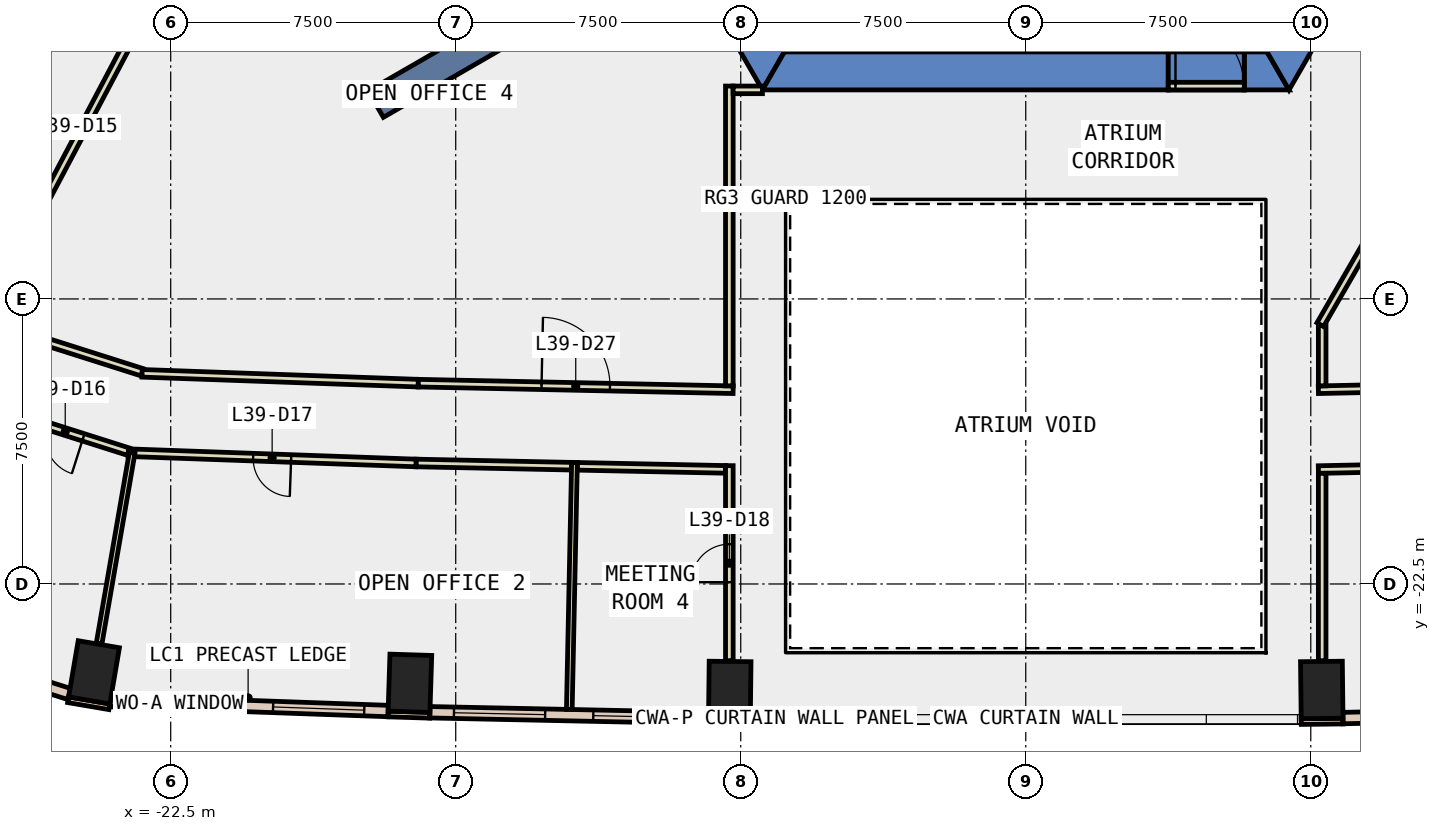
"""IFC4 building model, lengths in metres.
Left out: names, types, materials, properties, quantities, classifications, styles, units other than length and angle.
Written with IfcOpenShell. Run it as: python <this file> out.ifc"""

import sys

from ifc_helpers import new_model, si_unit, direction, frame, frame_2d, origin, origin_2d, place, context, subcontext, project, spatial, polyline, rectangle, outline, extrude, element, fill, save


model = new_model("IFC4")
c1 = context("Model", 3, precision=1e-05, world=origin(), true_north=direction((0.0, 1.0)))
c2 = subcontext(c1, "Body", "Model", "MODEL_VIEW")
j1 = project(units=[si_unit("LENGTHUNIT", "METRE"), si_unit("PLANEANGLEUNIT", "RADIAN")], contexts=[c1])
p1 = place(None, origin())
s1 = spatial("IfcSite", under=j1, at=p1, CompositionType="ELEMENT")
p2 = place(p1, origin())
s2 = spatial("IfcBuilding", under=s1, at=p2, CompositionType="ELEMENT")
p3 = place(p2, frame((0.0, 0.0, 176.0)))
s3 = spatial("IfcBuildingStorey", under=s2, at=p3, CompositionType="ELEMENT", Elevation=176.0)
for number, where, z_axis, x_axis in (
    (1, (-24.518, -24.825, -0.4), (0.0, 0.0, 1.0), (-0.986, 0.168, 0.0)),
    (2, (-16.205, -25.113, -0.4), (0.0, 0.0, 1.0), (-0.999, 0.032, 0.0)),
    (3, (-7.789, -25.289, -0.4), (0.0, 0.0, 1.0), (-1.0, 0.012, 0.0)),
    (4, (7.789, -25.289, -0.4), (0.0, 0.0, 1.0), (1.0, 0.012, 0.0)),
):
    element("IfcColumn", number, at=place(p3, frame(where, z_axis=z_axis, x_axis=x_axis)), inside=s3, PredefinedType="COLUMN", context=c2, shape_type="SweptSolid", body=[
        extrude(rectangle(XDim=1.1, YDim=1.5, at=origin_2d()), origin(), (0.0, 0.0, 1.0), 4.2),
    ])
p4 = place(p3, frame((0.0, 0.0, -0.4)))
e5 = element("IfcWall", 5, at=p4, inside=s3, PredefinedType="SHEAR", context=c2, shape_type="SweptSolid", body=[
    extrude(outline(polyline([(-13.856, 2.5), (-6.928, -9.5), (-6.351, -8.5), (-12.702, 2.5), (-13.856, 2.5)])), origin(), (0.0, 0.0, 1.0), 4.2),
])
p5 = place(p3, frame((0.0, 0.0, -0.4)))
e6 = element("IfcWall", 6, at=p5, inside=s3, PredefinedType="SHEAR", context=c2, shape_type="SweptSolid", body=[
    extrude(outline(polyline([(3.75, -9.5), (3.75, -8.5), (-6.351, -8.5), (-6.928, -9.5), (3.75, -9.5)])), origin(), (0.0, 0.0, 1.0), 4.2),
])
p6 = place(p3, frame((0.0, 0.0, -0.4)))
e7 = element("IfcWall", 7, at=p6, inside=s3, PredefinedType="SHEAR", context=c2, shape_type="SweptSolid", body=[
    extrude(outline(polyline([(5.75, -8.5), (5.75, -9.5), (6.928, -9.5), (6.351, -8.5), (5.75, -8.5)])), origin(), (0.0, 0.0, 1.0), 4.2),
])
p7 = place(p3, frame((0.0, 0.0, 3.6)))
e8 = element("IfcWall", 8, at=p7, inside=s3, PredefinedType="SHEAR", context=c2, shape_type="SweptSolid", body=[
    extrude(outline(polyline([(5.75, -9.5), (5.75, -8.5), (3.75, -8.5), (3.75, -9.5), (5.75, -9.5)])), origin(), (0.0, 0.0, 1.0), 0.2),
])
p8 = place(p3, frame((0.0, 0.0, -0.4)))
e9 = element("IfcWall", 9, at=p8, inside=s3, PredefinedType="SHEAR", context=c2, shape_type="SweptSolid", body=[
    extrude(outline(polyline([(8.117, -7.44), (7.252, -6.94), (6.351, -8.5), (6.928, -9.5), (8.117, -7.44)])), origin(), (0.0, 0.0, 1.0), 4.2),
])
p9 = place(p3, frame((-9.31, -5.375, -0.4), z_axis=(0.0, 0.0, 1.0), x_axis=(-0.866017533419, -0.500013631625, 0.0)))
e10 = element("IfcWall", 10, at=p9, inside=s3, PredefinedType="SHEAR", context=c2, shape_type="SweptSolid", body=[
    extrude(rectangle(XDim=9.0, YDim=0.8, at=frame_2d((4.5, 0.0))), origin(), (0.0, 0.0, 1.0), 4.2),
])
p10 = place(p3, frame((-25.199, -25.546, 0.0), z_axis=(0.0, 0.0, 1.0), x_axis=(0.985763338892, -0.168138751323, 0.0)))
e11 = element("IfcWall", 11, at=p10, inside=s3, PredefinedType="STANDARD", context=c2, shape_type="SweptSolid", body=[
    extrude(rectangle(XDim=1.101, YDim=0.15, at=frame_2d((0.55, 0.0))), origin(), (0.0, 0.0, 1.0), 3.8),
])
p11 = place(p3, frame((-16.781, -25.921, 0.0), z_axis=(0.0, 0.0, 1.0), x_axis=(0.99951682968, -0.031082264806, 0.0)))
e12 = element("IfcWall", 12, at=p11, inside=s3, PredefinedType="STANDARD", context=c2, shape_type="SweptSolid", body=[
    extrude(rectangle(XDim=1.1, YDim=0.15, at=frame_2d((0.55, 0.0))), origin(), (0.0, 0.0, 1.0), 3.8),
])
for number, where, z_axis, x_axis in (
    (13, (-8.349, -26.108, 0.0), (0.0, 0.0, 1.0), (1.0, -0.011, 0.0)),
    (14, (7.249, -26.12, 0.0), (0.0, 0.0, 1.0), (1.0, 0.011, 0.0)),
):
    element("IfcWall", number, at=place(p3, frame(where, z_axis=z_axis, x_axis=x_axis)), inside=s3, PredefinedType="STANDARD", context=c2, shape_type="SweptSolid", body=[
        extrude(rectangle(XDim=1.1, YDim=0.15, at=frame_2d((0.55, 0.0))), origin(), (0.0, 0.0, 1.0), 3.8),
    ])
p12 = place(p3, frame((-24.09, -25.583, 0.0), z_axis=(0.0, 0.0, 1.0), x_axis=(0.999368368263, -0.035536805082, 0.0)))
e15 = element("IfcWall", 15, at=p12, inside=s3, PredefinedType="STANDARD", context=c2, shape_type="SweptSolid", body=[
    extrude(rectangle(XDim=7.317, YDim=0.3, at=frame_2d((3.658, 0.0))), origin(), (0.0, 0.0, 1.0), 3.8),
])
p13 = place(p12, frame((0.629, 0.0, 0.9)))
e16 = element("IfcOpeningElement", 16, at=p13, cuts=e15, PredefinedType="OPENING", context=c2, shape_type="SweptSolid", body=[
    extrude(rectangle(XDim=2.4, YDim=2.6, at=frame_2d((1.2, 1.3))), frame((0.0, 0.16, 0.0), z_axis=(0.0, -1.0, 0.0), x_axis=(1.0, 0.0, 0.0)), (0.0, 0.0, 1.0), 0.32),
])
p14 = place(p12, frame((4.287, 0.0, 0.9)))
e17 = element("IfcOpeningElement", 17, at=p14, cuts=e15, PredefinedType="OPENING", context=c2, shape_type="SweptSolid", body=[
    extrude(rectangle(XDim=2.4, YDim=2.6, at=frame_2d((1.2, 1.3))), frame((0.0, 0.16, 0.0), z_axis=(0.0, -1.0, 0.0), x_axis=(1.0, 0.0, 0.0)), (0.0, 0.0, 1.0), 0.32),
])
p15 = place(p3, frame((-15.68, -25.875, 0.0), z_axis=(0.0, 0.0, 1.0), x_axis=(0.999782189413, -0.020870403275, 0.0)))
e18 = element("IfcWall", 18, at=p15, inside=s3, PredefinedType="STANDARD", context=c2, shape_type="SweptSolid", body=[
    extrude(rectangle(XDim=7.335, YDim=0.3, at=frame_2d((3.667, 0.0))), origin(), (0.0, 0.0, 1.0), 3.8),
])
p16 = place(p15, frame((0.634, 0.0, 0.9)))
e19 = element("IfcOpeningElement", 19, at=p16, cuts=e18, PredefinedType="OPENING", context=c2, shape_type="SweptSolid", body=[
    extrude(rectangle(XDim=2.4, YDim=2.6, at=frame_2d((1.2, 1.3))), frame((0.0, 0.16, 0.0), z_axis=(0.0, -1.0, 0.0), x_axis=(1.0, 0.0, 0.0)), (0.0, 0.0, 1.0), 0.32),
])
p17 = place(p15, frame((4.301, 0.0, 0.9)))
e20 = element("IfcOpeningElement", 20, at=p17, cuts=e18, PredefinedType="OPENING", context=c2, shape_type="SweptSolid", body=[
    extrude(rectangle(XDim=2.4, YDim=2.6, at=frame_2d((1.2, 1.3))), frame((0.0, 0.16, 0.0), z_axis=(0.0, -1.0, 0.0), x_axis=(1.0, 0.0, 0.0)), (0.0, 0.0, 1.0), 0.32),
])
p18 = place(p3, frame((8.347, -26.028, 0.0), z_axis=(0.0, 0.0, 1.0), x_axis=(0.999782189413, 0.020870403275, 0.0)))
e21 = element("IfcWall", 21, at=p18, inside=s3, PredefinedType="STANDARD", context=c2, shape_type="SweptSolid", body=[
    extrude(rectangle(XDim=7.335, YDim=0.3, at=frame_2d((3.667, 0.0))), origin(), (0.0, 0.0, 1.0), 3.8),
])
p19 = place(p18, frame((0.634, 0.0, 0.9)))
e22 = element("IfcOpeningElement", 22, at=p19, cuts=e21, PredefinedType="OPENING", context=c2, shape_type="SweptSolid", body=[
    extrude(rectangle(XDim=2.4, YDim=2.6, at=frame_2d((1.2, 1.3))), frame((0.0, 0.16, 0.0), z_axis=(0.0, -1.0, 0.0), x_axis=(1.0, 0.0, 0.0)), (0.0, 0.0, 1.0), 0.32),
])
p20 = place(p18, frame((4.301, 0.0, 0.9)))
e23 = element("IfcOpeningElement", 23, at=p20, cuts=e21, PredefinedType="OPENING", context=c2, shape_type="SweptSolid", body=[
    extrude(rectangle(XDim=2.4, YDim=2.6, at=frame_2d((1.2, 1.3))), frame((0.0, 0.16, 0.0), z_axis=(0.0, -1.0, 0.0), x_axis=(1.0, 0.0, 0.0)), (0.0, 0.0, 1.0), 0.32),
])
p21 = place(p3, frame((-29.662, -23.97, 0.0), z_axis=(0.0, 0.0, 1.0), x_axis=(0.953145379857, -0.302512619337, 0.0)))
e24 = element("IfcWall", 24, at=p21, inside=s3, PredefinedType="STANDARD", context=c2, shape_type="SweptSolid", body=[
    extrude(rectangle(XDim=4.711, YDim=0.3, at=frame_2d((2.355, 0.0))), origin(), (0.0, 0.0, 1.0), 3.8),
])
p22 = place(p21, frame((1.655, 0.0, 0.9)))
e25 = element("IfcOpeningElement", 25, at=p22, cuts=e24, PredefinedType="OPENING", context=c2, shape_type="SweptSolid", body=[
    extrude(rectangle(XDim=1.4, YDim=2.6, at=frame_2d((0.7, 1.3))), frame((0.0, 0.16, 0.0), z_axis=(0.0, -1.0, 0.0), x_axis=(1.0, 0.0, 0.0)), (0.0, 0.0, 1.0), 0.32),
])
p23 = place(p3, frame((7.7, -17.389, 0.0), z_axis=(0.0, 0.0, 1.0), x_axis=(0.999782442794, 0.020858261713, 0.0)))
e26 = element("IfcWall", 26, at=p23, inside=s3, PredefinedType="PARTITIONING", context=c2, shape_type="SweptSolid", body=[
    extrude(rectangle(XDim=8.287, YDim=0.2, at=frame_2d((4.144, 0.0))), origin(), (0.0, 0.0, 1.0), 3.75),
])
p24 = place(p23, frame((3.644, 0.0, 0.0)))
e27 = element("IfcOpeningElement", 27, at=p24, cuts=e26, PredefinedType="OPENING", context=c2, shape_type="SweptSolid", body=[
    extrude(rectangle(XDim=1.0, YDim=2.1, at=frame_2d((0.5, 1.05))), frame((0.0, 0.11, 0.0), z_axis=(0.0, -1.0, 0.0), x_axis=(1.0, 0.0, 0.0)), (0.0, 0.0, 1.0), 0.22),
])
p25 = place(p3, frame((-22.888, -6.878, 0.0), z_axis=(0.0, 0.0, 1.0), x_axis=(-0.467533790284, -0.883975200411, 0.0)))
e28 = element("IfcWall", 28, at=p25, inside=s3, PredefinedType="PARTITIONING", context=c2, shape_type="SweptSolid", body=[
    extrude(rectangle(XDim=6.656, YDim=0.2, at=frame_2d((3.328, 0.0))), origin(), (0.0, 0.0, 1.0), 3.75),
])
p26 = place(p3, frame((-25.864, -16.1, 0.0), z_axis=(0.0, 0.0, 1.0), x_axis=(0.953158072423, -0.302472625167, 0.0)))
e29 = element("IfcWall", 29, at=p26, inside=s3, PredefinedType="PARTITIONING", context=c2, shape_type="SweptSolid", body=[
    extrude(rectangle(XDim=2.743, YDim=0.2, at=frame_2d((1.372, 0.0))), origin(), (0.0, 0.0, 1.0), 3.75),
])
p27 = place(p3, frame((-23.253, -16.957, 0.0), z_axis=(0.0, 0.0, 1.0), x_axis=(0.999365460355, -0.035618487468, 0.0)))
e30 = element("IfcWall", 30, at=p27, inside=s3, PredefinedType="PARTITIONING", context=c2, shape_type="SweptSolid", body=[
    extrude(rectangle(XDim=7.272, YDim=0.2, at=frame_2d((3.636, 0.0))), origin(), (0.0, 0.0, 1.0), 3.75),
])
p28 = place(p3, frame((-15.985, -17.216, 0.0), z_axis=(0.0, 0.0, 1.0), x_axis=(0.999782442794, -0.020858261713, 0.0)))
e31 = element("IfcWall", 31, at=p28, inside=s3, PredefinedType="PARTITIONING", context=c2, shape_type="SweptSolid", body=[
    extrude(rectangle(XDim=8.287, YDim=0.2, at=frame_2d((4.144, 0.0))), origin(), (0.0, 0.0, 1.0), 3.75),
])
p29 = place(p28, frame((3.244, 0.0, 0.0)))
e32 = element("IfcOpeningElement", 32, at=p29, cuts=e31, PredefinedType="OPENING", context=c2, shape_type="SweptSolid", body=[
    extrude(rectangle(XDim=1.8, YDim=2.1, at=frame_2d((0.9, 1.05))), frame((0.0, 0.11, 0.0), z_axis=(0.0, -1.0, 0.0), x_axis=(1.0, 0.0, 0.0)), (0.0, 0.0, 1.0), 0.22),
])
p30 = place(p3, frame((16.045, -19.316, 0.0), z_axis=(0.0, 0.0, 1.0), x_axis=(-0.99978251073, -0.020855005124, 0.0)))
e33 = element("IfcWall", 33, at=p30, inside=s3, PredefinedType="PARTITIONING", context=c2, shape_type="SweptSolid", body=[
    extrude(rectangle(XDim=8.347, YDim=0.2, at=frame_2d((4.173, 0.0))), origin(), (0.0, 0.0, 1.0), 3.75),
])
p31 = place(p30, frame((3.673, 0.0, 0.0)))
e34 = element("IfcOpeningElement", 34, at=p31, cuts=e33, PredefinedType="OPENING", context=c2, shape_type="SweptSolid", body=[
    extrude(rectangle(XDim=1.0, YDim=2.1, at=frame_2d((0.5, 1.05))), frame((0.0, 0.11, 0.0), z_axis=(0.0, -1.0, 0.0), x_axis=(1.0, 0.0, 0.0)), (0.0, 0.0, 1.0), 0.22),
])
p32 = place(p3, frame((-26.376, -8.982, 0.0), z_axis=(0.0, 0.0, 1.0), x_axis=(0.467529077139, 0.883977693174, 0.0)))
e35 = element("IfcWall", 35, at=p32, inside=s3, PredefinedType="PARTITIONING", context=c2, shape_type="SweptSolid", body=[
    extrude(rectangle(XDim=3.503, YDim=0.2, at=frame_2d((1.752, 0.0))), origin(), (0.0, 0.0, 1.0), 3.75),
])
p33 = place(p3, frame((-23.61, -19.019, 0.0), z_axis=(0.0, 0.0, 1.0), x_axis=(-0.953121068097, 0.302589209243, 0.0)))
e36 = element("IfcWall", 36, at=p33, inside=s3, PredefinedType="PARTITIONING", context=c2, shape_type="SweptSolid", body=[
    extrude(rectangle(XDim=3.494, YDim=0.2, at=frame_2d((1.747, 0.0))), origin(), (0.0, 0.0, 1.0), 3.75),
])
p34 = place(p33, frame((1.247, 0.0, 0.0)))
e37 = element("IfcOpeningElement", 37, at=p34, cuts=e36, PredefinedType="OPENING", context=c2, shape_type="SweptSolid", body=[
    extrude(rectangle(XDim=1.0, YDim=2.1, at=frame_2d((0.5, 1.05))), frame((0.0, 0.11, 0.0), z_axis=(0.0, -1.0, 0.0), x_axis=(1.0, 0.0, 0.0)), (0.0, 0.0, 1.0), 0.22),
])
p35 = place(p3, frame((-11.952, -19.401, 0.0), z_axis=(0.0, 0.0, 1.0), x_axis=(-0.999784632057, 0.020753060063, 0.0)))
e38 = element("IfcWall", 38, at=p35, inside=s3, PredefinedType="PARTITIONING", context=c2, shape_type="SweptSolid", body=[
    extrude(rectangle(XDim=4.094, YDim=0.2, at=frame_2d((2.047, 0.0))), origin(), (0.0, 0.0, 1.0), 3.75),
])
p36 = place(p3, frame((-16.045, -19.316, 0.0), z_axis=(0.0, 0.0, 1.0), x_axis=(-0.999359853626, 0.035775451915, 0.0)))
e39 = element("IfcWall", 39, at=p36, inside=s3, PredefinedType="PARTITIONING", context=c2, shape_type="SweptSolid", body=[
    extrude(rectangle(XDim=7.575, YDim=0.2, at=frame_2d((3.788, 0.0))), origin(), (0.0, 0.0, 1.0), 3.75),
])
p37 = place(p36, frame((3.288, 0.0, 0.0)))
e40 = element("IfcOpeningElement", 40, at=p37, cuts=e39, PredefinedType="OPENING", context=c2, shape_type="SweptSolid", body=[
    extrude(rectangle(XDim=1.0, YDim=2.1, at=frame_2d((0.5, 1.05))), frame((0.0, 0.11, 0.0), z_axis=(0.0, -1.0, 0.0), x_axis=(1.0, 0.0, 0.0)), (0.0, 0.0, 1.0), 0.22),
])
p38 = place(p3, frame((-7.9, -19.485, 0.0), z_axis=(0.0, 0.0, 1.0), x_axis=(-0.999784330337, 0.020767590419, 0.0)))
e41 = element("IfcWall", 41, at=p38, inside=s3, PredefinedType="PARTITIONING", context=c2, shape_type="SweptSolid", body=[
    extrude(rectangle(XDim=3.903, YDim=0.2, at=frame_2d((1.951, 0.0))), origin(), (0.0, 0.0, 1.0), 3.75),
])
p39 = place(p3, frame((7.8, -15.69, 0.0), z_axis=(0.0, 0.0, 1.0), x_axis=(0.0, -1.0, 0.0)))
e42 = element("IfcWall", 42, at=p39, inside=s3, PredefinedType="PARTITIONING", context=c2, shape_type="SweptSolid", body=[
    extrude(rectangle(XDim=1.597, YDim=0.2, at=frame_2d((0.799, 0.0))), origin(), (0.0, 0.0, 1.0), 3.75),
])
p40 = place(p3, frame((-7.8, -17.287, 0.0), z_axis=(0.0, 0.0, 1.0), x_axis=(0.0, 1.0, 0.0)))
e43 = element("IfcWall", 43, at=p40, inside=s3, PredefinedType="PARTITIONING", context=c2, shape_type="SweptSolid", body=[
    extrude(rectangle(XDim=7.888, YDim=0.2, at=frame_2d((3.944, 0.0))), origin(), (0.0, 0.0, 1.0), 3.75),
])
p41 = place(p3, frame((-7.7, -9.499, 0.0), z_axis=(0.0, 0.0, 1.0), x_axis=(1.0, 0.0, 0.0)))
e44 = element("IfcWall", 44, at=p41, inside=s3, PredefinedType="PARTITIONING", context=c2, shape_type="SweptSolid", body=[
    extrude(rectangle(XDim=0.771, YDim=0.2, at=frame_2d((0.385, 0.0))), origin(), (0.0, 0.0, 1.0), 3.75),
])
p42 = place(p3, frame((7.8, -19.588, 0.0), z_axis=(0.0, 0.0, 1.0), x_axis=(0.0, -1.0, 0.0)))
e45 = element("IfcWall", 45, at=p42, inside=s3, PredefinedType="PARTITIONING", context=c2, shape_type="SweptSolid", body=[
    extrude(rectangle(XDim=4.931, YDim=0.2, at=frame_2d((2.466, 0.0))), origin(), (0.0, 0.0, 1.0), 3.75),
])
p43 = place(p3, frame((-7.8, -24.519, 0.0), z_axis=(0.0, 0.0, 1.0), x_axis=(0.0, 1.0, 0.0)))
e46 = element("IfcWall", 46, at=p43, inside=s3, PredefinedType="PARTITIONING", context=c2, shape_type="SweptSolid", body=[
    extrude(rectangle(XDim=5.132, YDim=0.2, at=frame_2d((2.566, 0.0))), origin(), (0.0, 0.0, 1.0), 3.75),
])
p44 = place(p43, frame((2.066, 0.0, 0.0)))
e47 = element("IfcOpeningElement", 47, at=p44, cuts=e46, PredefinedType="OPENING", context=c2, shape_type="SweptSolid", body=[
    extrude(rectangle(XDim=1.0, YDim=2.1, at=frame_2d((0.5, 1.05))), frame((0.0, 0.11, 0.0), z_axis=(0.0, -1.0, 0.0), x_axis=(1.0, 0.0, 0.0)), (0.0, 0.0, 1.0), 0.22),
])
p45 = place(p3, frame((12.476, -7.491, 0.0), z_axis=(0.0, 0.0, 1.0), x_axis=(-0.499989258007, -0.866031605588, 0.0)))
e48 = element("IfcWall", 48, at=p45, inside=s3, PredefinedType="PARTITIONING", context=c2, shape_type="SweptSolid", body=[
    extrude(rectangle(XDim=9.452, YDim=0.2, at=frame_2d((4.726, 0.0))), origin(), (0.0, 0.0, 1.0), 3.75),
])
p46 = place(p3, frame((-23.515, -19.049, 0.0), z_axis=(0.0, 0.0, 1.0), x_axis=(-0.170669435204, -0.985328343187, 0.0)))
e49 = element("IfcWall", 49, at=p46, inside=s3, PredefinedType="PARTITIONING", context=c2, shape_type="SweptSolid", body=[
    extrude(rectangle(XDim=5.093, YDim=0.15, at=frame_2d((2.546, 0.0))), origin(), (0.0, 0.0, 1.0), 3.75),
])
p47 = place(p3, frame((-11.875, -19.303, 0.0), z_axis=(0.0, 0.0, 1.0), x_axis=(-0.020922680752, -0.999781096756, 0.0)))
e50 = element("IfcWall", 50, at=p47, inside=s3, PredefinedType="PARTITIONING", context=c2, shape_type="SweptSolid", body=[
    extrude(rectangle(XDim=6.5, YDim=0.15, at=frame_2d((3.25, 0.0))), origin(), (0.0, 0.0, 1.0), 3.75),
])
p48 = place(p3, frame((3.75, -9.4, 0.0), z_axis=(0.0, 0.0, 1.0), x_axis=(1.0, 0.0, 0.0)))
e51 = element("IfcWall", 51, at=p48, inside=s3, PredefinedType="PARTITIONING", context=c2, shape_type="SweptSolid", body=[
    extrude(rectangle(XDim=2.0, YDim=0.2, at=frame_2d((1.0, 0.0))), origin(), (0.0, 0.0, 1.0), 2.4),
])
p49 = place(p48, frame((0.19, 0.0, 0.0)))
e52 = element("IfcOpeningElement", 52, at=p49, cuts=e51, PredefinedType="OPENING", context=c2, shape_type="SweptSolid", body=[
    extrude(rectangle(XDim=1.8, YDim=2.1, at=frame_2d((0.9, 1.05))), frame((0.0, 0.11, 0.0), z_axis=(0.0, -1.0, 0.0), x_axis=(1.0, 0.0, 0.0)), (0.0, 0.0, 1.0), 0.22),
])
p50 = place(p13, origin())
e53 = element("IfcWindow", 53, at=p50, inside=s3, PartitioningType="SINGLE_PANEL", PredefinedType="WINDOW", context=c2, shape_type="SweptSolid", body=[
    extrude(rectangle(XDim=2.4, YDim=2.6, at=frame_2d((1.2, 1.3))), frame((0.0, 0.03, 0.0), z_axis=(0.0, -1.0, 0.0), x_axis=(1.0, 0.0, 0.0)), (0.0, 0.0, 1.0), 0.06),
])
fill(e16, e53)
p51 = place(p14, origin())
e54 = element("IfcWindow", 54, at=p51, inside=s3, PartitioningType="SINGLE_PANEL", PredefinedType="WINDOW", context=c2, shape_type="SweptSolid", body=[
    extrude(rectangle(XDim=2.4, YDim=2.6, at=frame_2d((1.2, 1.3))), frame((0.0, 0.03, 0.0), z_axis=(0.0, -1.0, 0.0), x_axis=(1.0, 0.0, 0.0)), (0.0, 0.0, 1.0), 0.06),
])
fill(e17, e54)
p52 = place(p16, origin())
e55 = element("IfcWindow", 55, at=p52, inside=s3, PartitioningType="SINGLE_PANEL", PredefinedType="WINDOW", context=c2, shape_type="SweptSolid", body=[
    extrude(rectangle(XDim=2.4, YDim=2.6, at=frame_2d((1.2, 1.3))), frame((0.0, 0.03, 0.0), z_axis=(0.0, -1.0, 0.0), x_axis=(1.0, 0.0, 0.0)), (0.0, 0.0, 1.0), 0.06),
])
fill(e19, e55)
p53 = place(p17, origin())
e56 = element("IfcWindow", 56, at=p53, inside=s3, PartitioningType="SINGLE_PANEL", PredefinedType="WINDOW", context=c2, shape_type="SweptSolid", body=[
    extrude(rectangle(XDim=2.4, YDim=2.6, at=frame_2d((1.2, 1.3))), frame((0.0, 0.03, 0.0), z_axis=(0.0, -1.0, 0.0), x_axis=(1.0, 0.0, 0.0)), (0.0, 0.0, 1.0), 0.06),
])
fill(e20, e56)
p54 = place(p34, origin())
e57 = element("IfcDoor", 57, at=p54, inside=s3, OperationType="SINGLE_SWING_LEFT", PredefinedType="DOOR", context=c2, shape_type="SweptSolid", body=[
    extrude(rectangle(XDim=1.0, YDim=2.1, at=frame_2d((0.5, 1.05))), frame((0.0, 0.025, 0.0), z_axis=(0.0, -1.0, 0.0), x_axis=(1.0, 0.0, 0.0)), (0.0, 0.0, 1.0), 0.05),
])
fill(e37, e57)
p55 = place(p37, origin())
e58 = element("IfcDoor", 58, at=p55, inside=s3, OperationType="SINGLE_SWING_LEFT", PredefinedType="DOOR", context=c2, shape_type="SweptSolid", body=[
    extrude(rectangle(XDim=1.0, YDim=2.1, at=frame_2d((0.5, 1.05))), frame((0.0, 0.025, 0.0), z_axis=(0.0, -1.0, 0.0), x_axis=(1.0, 0.0, 0.0)), (0.0, 0.0, 1.0), 0.05),
])
fill(e40, e58)
p56 = place(p44, origin())
e59 = element("IfcDoor", 59, at=p56, inside=s3, OperationType="SINGLE_SWING_LEFT", PredefinedType="DOOR", context=c2, shape_type="SweptSolid", body=[
    extrude(rectangle(XDim=1.0, YDim=2.1, at=frame_2d((0.5, 1.05))), frame((0.0, 0.025, 0.0), z_axis=(0.0, -1.0, 0.0), x_axis=(1.0, 0.0, 0.0)), (0.0, 0.0, 1.0), 0.05),
])
fill(e47, e59)
p57 = place(p29, origin())
e60 = element("IfcDoor", 60, at=p57, inside=s3, OperationType="DOUBLE_DOOR_SINGLE_SWING", PredefinedType="DOOR", context=c2, shape_type="SweptSolid", body=[
    extrude(rectangle(XDim=1.8, YDim=2.1, at=frame_2d((0.9, 1.05))), frame((0.0, 0.025, 0.0), z_axis=(0.0, -1.0, 0.0), x_axis=(1.0, 0.0, 0.0)), (0.0, 0.0, 1.0), 0.05),
])
fill(e32, e60)
p58 = place(p49, origin())
e61 = element("IfcDoor", 61, at=p58, inside=s3, OperationType="DOUBLE_DOOR_SINGLE_SWING", PredefinedType="DOOR", context=c2, shape_type="SweptSolid", body=[
    extrude(rectangle(XDim=1.8, YDim=2.1, at=frame_2d((0.9, 1.05))), frame((0.0, 0.025, 0.0), z_axis=(0.0, -1.0, 0.0), x_axis=(1.0, 0.0, 0.0)), (0.0, 0.0, 1.0), 0.05),
])
fill(e52, e61)
save(model, sys.argv[1])
